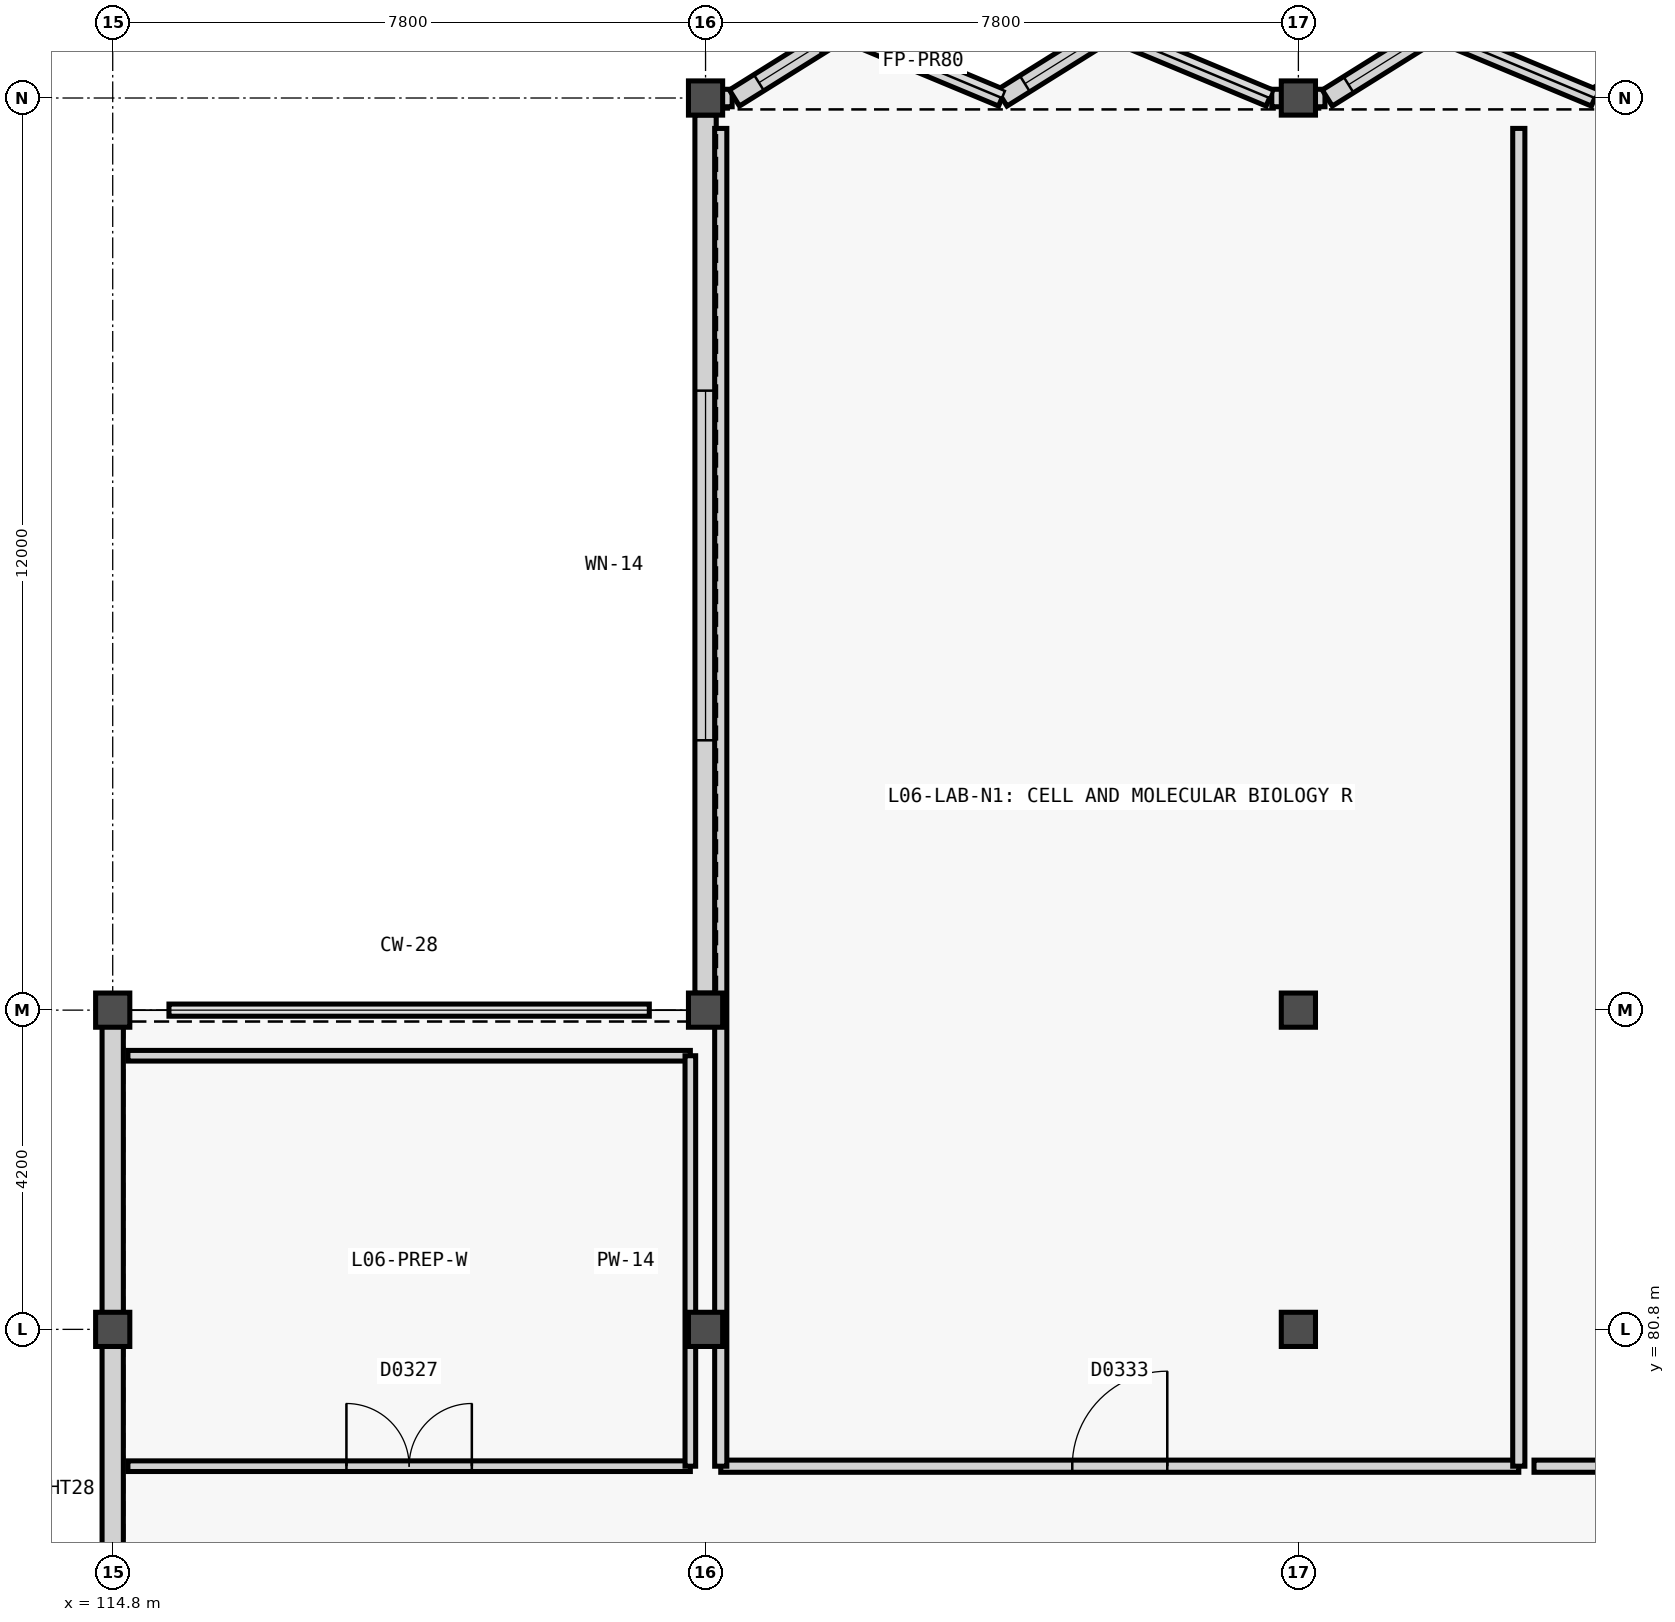
"""IFC4 building model, lengths in metres.
Left out: names, types, materials, properties, quantities, classifications, styles, units other than length and angle.
Written with IfcOpenShell. Run it as: python <this file> out.ifc"""

import sys

from ifc_helpers import new_model, si_unit, direction, frame, frame_2d, origin, origin_2d, place, context, subcontext, project, spatial, rectangle, extrude, element, fill, save


model = new_model("IFC4")
c1 = context("Model", 3, precision=1e-05, world=origin(), true_north=direction((0.0, 1.0)))
c2 = subcontext(c1, "Body", "Model", "MODEL_VIEW")
j1 = project(units=[si_unit("LENGTHUNIT", "METRE"), si_unit("PLANEANGLEUNIT", "RADIAN")], contexts=[c1])
p1 = place(None, origin())
s1 = spatial("IfcSite", under=j1, at=p1, CompositionType="ELEMENT")
p2 = place(p1, origin())
s2 = spatial("IfcBuilding", under=s1, at=p2, CompositionType="ELEMENT")
p3 = place(p2, frame((0.0, 0.0, 25.2)))
s3 = spatial("IfcBuildingStorey", under=s2, at=p3, CompositionType="ELEMENT", Elevation=25.2)
for number, where, z_axis, x_axis in (
    (1, (114.8, 80.8, 0.0), (0.0, 0.0, 1.0), (1.0, 0.0, 0.0)),
    (2, (114.8, 85.0, 0.0), (0.0, 0.0, 1.0), (1.0, 0.0, 0.0)),
    (3, (122.6, 80.8, 0.0), (0.0, 0.0, 1.0), (1.0, 0.0, 0.0)),
    (4, (122.6, 85.0, 0.0), (0.0, 0.0, 1.0), (1.0, 0.0, 0.0)),
    (5, (122.6, 97.0, 0.0), (0.0, 0.0, 1.0), (1.0, 0.0, 0.0)),
    (6, (130.4, 80.8, 0.0), (0.0, 0.0, 1.0), (1.0, 0.0, 0.0)),
    (7, (130.4, 85.0, 0.0), (0.0, 0.0, 1.0), (1.0, 0.0, 0.0)),
    (8, (130.4, 97.0, 0.0), (0.0, 0.0, 1.0), (1.0, 0.0, 0.0)),
):
    element("IfcColumn", number, at=place(p3, frame(where, z_axis=z_axis, x_axis=x_axis)), inside=s3, PredefinedType="COLUMN", context=c2, shape_type="SweptSolid", body=[
        extrude(rectangle(XDim=0.45, YDim=0.45, at=origin_2d()), origin(), (0.0, 0.0, 1.0), 3.6),
    ])
p4 = place(p3, frame((122.6, 85.223, 0.0), z_axis=(0.0, 0.0, 1.0), x_axis=(0.0, 1.0, 0.0)))
e9 = element("IfcWall", 9, at=p4, inside=s3, PredefinedType="SOLIDWALL", context=c2, shape_type="SweptSolid", body=[
    extrude(rectangle(XDim=11.554, YDim=0.28, at=frame_2d((5.777, 0.0))), origin(), (0.0, 0.0, 1.0), 2.88),
])
p5 = place(p4, frame((3.327, 0.0, 0.82)))
e10 = element("IfcOpeningElement", 10, at=p5, cuts=e9, PredefinedType="OPENING", context=c2, shape_type="SweptSolid", body=[
    extrude(rectangle(XDim=4.6, YDim=1.6, at=frame_2d((2.3, 0.8))), frame((0.0, 0.15, 0.0), z_axis=(0.0, -1.0, 0.0), x_axis=(1.0, 0.0, 0.0)), (0.0, 0.0, 1.0), 0.3),
])
p6 = place(p3, frame((114.8, 72.6, 0.0), z_axis=(0.0, 0.0, 1.0), x_axis=(0.0, 1.0, 0.0)))
e11 = element("IfcWall", 11, at=p6, inside=s3, PredefinedType="SOLIDWALL", context=c2, shape_type="SweptSolid", body=[
    extrude(rectangle(XDim=12.2, YDim=0.28, at=frame_2d((6.1, 0.0))), origin(), (0.0, 0.0, 1.0), 2.78),
])
for number, where, z_axis, x_axis in (
    (12, (122.6, 97.0, 0.0), (0.0, 0.0, 1.0), (1.0, 0.0, 0.0)),
    (13, (130.05, 97.0, 0.0), (0.0, 0.0, 1.0), (1.0, 0.0, 0.0)),
):
    element("IfcWall", number, at=place(p3, frame(where, z_axis=z_axis, x_axis=x_axis)), inside=s3, PredefinedType="SOLIDWALL", context=c2, shape_type="SweptSolid", body=[
        extrude(rectangle(XDim=0.35, YDim=0.23, at=frame_2d((0.175, 0.0))), origin(), (0.0, 0.0, 1.0), 3.36),
    ])
p7 = place(p3, frame((130.4, 97.0, 0.0), z_axis=(0.0, 0.0, 1.0), x_axis=(1.0, 0.0, 0.0)))
e14 = element("IfcWall", 14, at=p7, inside=s3, PredefinedType="SOLIDWALL", context=c2, shape_type="SweptSolid", body=[
    extrude(rectangle(XDim=0.35, YDim=0.23, at=frame_2d((0.175, 0.0))), origin(), (0.0, 0.0, 1.0), 3.36),
])
p8 = place(p3, frame((122.98, 97.0, 0.0), z_axis=(0.0, 0.0, 1.0), x_axis=(0.848023086369, 0.529959286158, 0.0)))
e15 = element("IfcWall", 15, at=p8, inside=s3, PredefinedType="SOLIDWALL", context=c2, shape_type="SweptSolid", body=[
    extrude(rectangle(XDim=1.66, YDim=0.25, at=frame_2d((0.83, 0.0))), origin(), (0.0, 0.0, 1.0), 3.36),
])
p9 = place(p8, frame((0.38, 0.0, 0.82)))
e16 = element("IfcOpeningElement", 16, at=p9, cuts=e15, PredefinedType="OPENING", context=c2, shape_type="SweptSolid", body=[
    extrude(rectangle(XDim=0.9, YDim=1.45, at=frame_2d((0.45, 0.725))), frame((0.0, 0.135, 0.0), z_axis=(0.0, -1.0, 0.0), x_axis=(1.0, 0.0, 0.0)), (0.0, 0.0, 1.0), 0.27),
])
p10 = place(p3, frame((124.388, 97.88, 0.0), z_axis=(0.0, 0.0, 1.0), x_axis=(0.92309902008, -0.384562347517, 0.0)))
e17 = element("IfcWall", 17, at=p10, inside=s3, PredefinedType="SOLIDWALL", context=c2, shape_type="SweptSolid", body=[
    extrude(rectangle(XDim=2.288, YDim=0.23, at=frame_2d((1.144, 0.0))), origin(), (0.0, 0.0, 1.0), 3.36),
])
p11 = place(p3, frame((126.5, 97.0, 0.0), z_axis=(0.0, 0.0, 1.0), x_axis=(0.848023086369, 0.529959286158, 0.0)))
e18 = element("IfcWall", 18, at=p11, inside=s3, PredefinedType="SOLIDWALL", context=c2, shape_type="SweptSolid", body=[
    extrude(rectangle(XDim=1.66, YDim=0.25, at=frame_2d((0.83, 0.0))), origin(), (0.0, 0.0, 1.0), 3.36),
])
p12 = place(p11, frame((0.355, 0.0, 0.82)))
e19 = element("IfcOpeningElement", 19, at=p12, cuts=e18, PredefinedType="OPENING", context=c2, shape_type="SweptSolid", body=[
    extrude(rectangle(XDim=0.95, YDim=1.5, at=frame_2d((0.475, 0.75))), frame((0.0, 0.135, 0.0), z_axis=(0.0, -1.0, 0.0), x_axis=(1.0, 0.0, 0.0)), (0.0, 0.0, 1.0), 0.27),
])
p13 = place(p3, frame((127.908, 97.88, 0.0), z_axis=(0.0, 0.0, 1.0), x_axis=(0.92309902008, -0.384562347517, 0.0)))
e20 = element("IfcWall", 20, at=p13, inside=s3, PredefinedType="SOLIDWALL", context=c2, shape_type="SweptSolid", body=[
    extrude(rectangle(XDim=2.288, YDim=0.23, at=frame_2d((1.144, 0.0))), origin(), (0.0, 0.0, 1.0), 3.36),
])
p14 = place(p3, frame((130.78, 97.0, 0.0), z_axis=(0.0, 0.0, 1.0), x_axis=(0.848023086369, 0.529959286158, 0.0)))
e21 = element("IfcWall", 21, at=p14, inside=s3, PredefinedType="SOLIDWALL", context=c2, shape_type="SweptSolid", body=[
    extrude(rectangle(XDim=1.66, YDim=0.25, at=frame_2d((0.83, 0.0))), origin(), (0.0, 0.0, 1.0), 3.36),
])
p15 = place(p14, frame((0.33, 0.0, 0.82)))
e22 = element("IfcOpeningElement", 22, at=p15, cuts=e21, PredefinedType="OPENING", context=c2, shape_type="SweptSolid", body=[
    extrude(rectangle(XDim=1.0, YDim=1.35, at=frame_2d((0.5, 0.675))), frame((0.0, 0.135, 0.0), z_axis=(0.0, -1.0, 0.0), x_axis=(1.0, 0.0, 0.0)), (0.0, 0.0, 1.0), 0.27),
])
p16 = place(p3, frame((132.188, 97.88, 0.0), z_axis=(0.0, 0.0, 1.0), x_axis=(0.92309902008, -0.384562347517, 0.0)))
e23 = element("IfcWall", 23, at=p16, inside=s3, PredefinedType="SOLIDWALL", context=c2, shape_type="SweptSolid", body=[
    extrude(rectangle(XDim=2.288, YDim=0.23, at=frame_2d((1.144, 0.0))), origin(), (0.0, 0.0, 1.0), 3.36),
])
p17 = place(p3, frame((134.3, 97.0, 0.0), z_axis=(0.0, 0.0, 1.0), x_axis=(0.848023086369, 0.529959286158, 0.0)))
e24 = element("IfcWall", 24, at=p17, inside=s3, PredefinedType="SOLIDWALL", context=c2, shape_type="SweptSolid", body=[
    extrude(rectangle(XDim=1.66, YDim=0.25, at=frame_2d((0.83, 0.0))), origin(), (0.0, 0.0, 1.0), 3.36),
])
p18 = place(p17, frame((0.305, 0.0, 0.82)))
e25 = element("IfcOpeningElement", 25, at=p18, cuts=e24, PredefinedType="OPENING", context=c2, shape_type="SweptSolid", body=[
    extrude(rectangle(XDim=1.05, YDim=1.4, at=frame_2d((0.525, 0.7))), frame((0.0, 0.135, 0.0), z_axis=(0.0, -1.0, 0.0), x_axis=(1.0, 0.0, 0.0)), (0.0, 0.0, 1.0), 0.27),
])
p19 = place(p3, frame((115.0, 79.0, 0.0), z_axis=(0.0, 0.0, 1.0), x_axis=(1.0, 0.0, 0.0)))
e26 = element("IfcWall", 26, at=p19, inside=s3, PredefinedType="PARTITIONING", context=c2, shape_type="SweptSolid", body=[
    extrude(rectangle(XDim=7.4, YDim=0.14, at=frame_2d((3.7, 0.0))), origin(), (0.0, 0.0, 1.0), 3.34),
])
p20 = place(p19, frame((2.875, 0.0, 0.0)))
e27 = element("IfcOpeningElement", 27, at=p20, cuts=e26, PredefinedType="OPENING", context=c2, shape_type="SweptSolid", body=[
    extrude(rectangle(XDim=1.65, YDim=2.3, at=frame_2d((0.825, 1.15))), frame((0.0, 0.08, 0.0), z_axis=(0.0, -1.0, 0.0), x_axis=(1.0, 0.0, 0.0)), (0.0, 0.0, 1.0), 0.16),
])
p21 = place(p3, frame((115.0, 84.4, 0.0), z_axis=(0.0, 0.0, 1.0), x_axis=(1.0, 0.0, 0.0)))
e28 = element("IfcWall", 28, at=p21, inside=s3, PredefinedType="PARTITIONING", context=c2, shape_type="SweptSolid", body=[
    extrude(rectangle(XDim=7.4, YDim=0.14, at=frame_2d((3.7, 0.0))), origin(), (0.0, 0.0, 1.0), 3.34),
])
p22 = place(p3, frame((122.4, 79.0, 0.0), z_axis=(0.0, 0.0, 1.0), x_axis=(0.0, 1.0, 0.0)))
e29 = element("IfcWall", 29, at=p22, inside=s3, PredefinedType="PARTITIONING", context=c2, shape_type="SweptSolid", body=[
    extrude(rectangle(XDim=5.4, YDim=0.14, at=frame_2d((2.7, 0.0))), origin(), (0.0, 0.0, 1.0), 2.82),
])
p23 = place(p3, frame((122.8, 79.0, 0.0), z_axis=(0.0, 0.0, 1.0), x_axis=(1.0, 0.0, 0.0)))
e30 = element("IfcWall", 30, at=p23, inside=s3, PredefinedType="PARTITIONING", context=c2, shape_type="SweptSolid", body=[
    extrude(rectangle(XDim=10.5, YDim=0.16, at=frame_2d((5.25, 0.0))), origin(), (0.0, 0.0, 1.0), 3.34),
])
p24 = place(p23, frame((4.625, 0.0, 0.0)))
e31 = element("IfcOpeningElement", 31, at=p24, cuts=e30, PredefinedType="OPENING", context=c2, shape_type="SweptSolid", body=[
    extrude(rectangle(XDim=1.25, YDim=2.2, at=frame_2d((0.625, 1.1))), frame((0.0, 0.09, 0.0), z_axis=(0.0, -1.0, 0.0), x_axis=(1.0, 0.0, 0.0)), (0.0, 0.0, 1.0), 0.18),
])
p25 = place(p3, frame((122.8, 79.0, 0.0), z_axis=(0.0, 0.0, 1.0), x_axis=(0.0, 1.0, 0.0)))
e32 = element("IfcWall", 32, at=p25, inside=s3, PredefinedType="PARTITIONING", context=c2, shape_type="SweptSolid", body=[
    extrude(rectangle(XDim=17.6, YDim=0.16, at=frame_2d((8.8, 0.0))), origin(), (0.0, 0.0, 1.0), 2.82),
])
p26 = place(p3, frame((133.3, 79.0, 0.0), z_axis=(0.0, 0.0, 1.0), x_axis=(0.0, 1.0, 0.0)))
e33 = element("IfcWall", 33, at=p26, inside=s3, PredefinedType="PARTITIONING", context=c2, shape_type="SweptSolid", body=[
    extrude(rectangle(XDim=17.6, YDim=0.16, at=frame_2d((8.8, 0.0))), origin(), (0.0, 0.0, 1.0), 3.34),
])
p27 = place(p3, frame((133.5, 79.0, 0.0), z_axis=(0.0, 0.0, 1.0), x_axis=(1.0, 0.0, 0.0)))
e34 = element("IfcWall", 34, at=p27, inside=s3, PredefinedType="PARTITIONING", context=c2, shape_type="SweptSolid", body=[
    extrude(rectangle(XDim=10.3, YDim=0.16, at=frame_2d((5.15, 0.0))), origin(), (0.0, 0.0, 1.0), 3.34),
])
p28 = place(p27, frame((4.625, 0.0, 0.0)))
e35 = element("IfcOpeningElement", 35, at=p28, cuts=e34, PredefinedType="OPENING", context=c2, shape_type="SweptSolid", body=[
    extrude(rectangle(XDim=1.05, YDim=2.15, at=frame_2d((0.525, 1.075))), frame((0.0, 0.09, 0.0), z_axis=(0.0, -1.0, 0.0), x_axis=(1.0, 0.0, 0.0)), (0.0, 0.0, 1.0), 0.18),
])
p29 = place(p5, origin())
e36 = element("IfcWindow", 36, at=p29, inside=s3, PartitioningType="SINGLE_PANEL", PredefinedType="WINDOW", context=c2, shape_type="SweptSolid", body=[
    extrude(rectangle(XDim=4.6, YDim=1.6, at=frame_2d((2.3, 0.8))), frame((0.0, 0.03, 0.0), z_axis=(0.0, -1.0, 0.0), x_axis=(1.0, 0.0, 0.0)), (0.0, 0.0, 1.0), 0.06),
])
fill(e10, e36)
p30 = place(p9, origin())
e37 = element("IfcWindow", 37, at=p30, inside=s3, PartitioningType="SINGLE_PANEL", PredefinedType="WINDOW", context=c2, shape_type="SweptSolid", body=[
    extrude(rectangle(XDim=0.9, YDim=1.45, at=frame_2d((0.45, 0.725))), frame((0.0, 0.03, 0.0), z_axis=(0.0, -1.0, 0.0), x_axis=(1.0, 0.0, 0.0)), (0.0, 0.0, 1.0), 0.06),
])
fill(e16, e37)
p31 = place(p12, origin())
e38 = element("IfcWindow", 38, at=p31, inside=s3, PartitioningType="SINGLE_PANEL", PredefinedType="WINDOW", context=c2, shape_type="SweptSolid", body=[
    extrude(rectangle(XDim=0.95, YDim=1.5, at=frame_2d((0.475, 0.75))), frame((0.0, 0.03, 0.0), z_axis=(0.0, -1.0, 0.0), x_axis=(1.0, 0.0, 0.0)), (0.0, 0.0, 1.0), 0.06),
])
fill(e19, e38)
p32 = place(p15, origin())
e39 = element("IfcWindow", 39, at=p32, inside=s3, PartitioningType="SINGLE_PANEL", PredefinedType="WINDOW", context=c2, shape_type="SweptSolid", body=[
    extrude(rectangle(XDim=1.0, YDim=1.35, at=frame_2d((0.5, 0.675))), frame((0.0, 0.03, 0.0), z_axis=(0.0, -1.0, 0.0), x_axis=(1.0, 0.0, 0.0)), (0.0, 0.0, 1.0), 0.06),
])
fill(e22, e39)
p33 = place(p20, origin())
e40 = element("IfcDoor", 40, at=p33, inside=s3, OperationType="DOUBLE_DOOR_SINGLE_SWING", PredefinedType="DOOR", context=c2, shape_type="SweptSolid", body=[
    extrude(rectangle(XDim=1.65, YDim=2.3, at=frame_2d((0.825, 1.15))), frame((0.0, 0.025, 0.0), z_axis=(0.0, -1.0, 0.0), x_axis=(1.0, 0.0, 0.0)), (0.0, 0.0, 1.0), 0.05),
])
fill(e27, e40)
p34 = place(p24, origin())
e41 = element("IfcDoor", 41, at=p34, inside=s3, OperationType="SINGLE_SWING_RIGHT", PredefinedType="DOOR", context=c2, shape_type="SweptSolid", body=[
    extrude(rectangle(XDim=1.25, YDim=2.2, at=frame_2d((0.625, 1.1))), frame((0.0, 0.025, 0.0), z_axis=(0.0, -1.0, 0.0), x_axis=(1.0, 0.0, 0.0)), (0.0, 0.0, 1.0), 0.05),
])
fill(e31, e41)
save(model, sys.argv[1])
